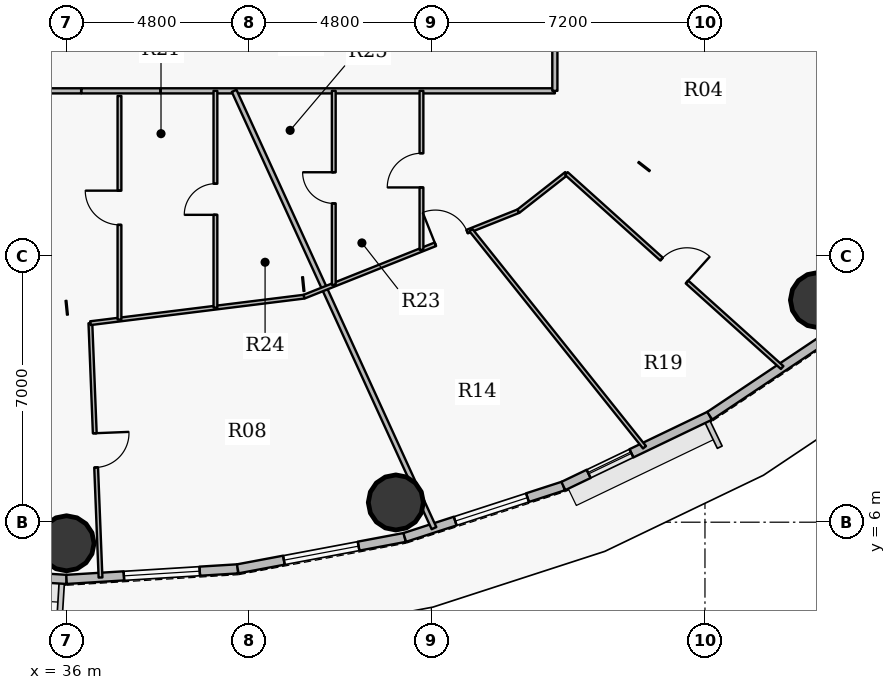
"""IFC4 building model, lengths in metres.
Left out: names, types, materials, properties, quantities, classifications, styles, units other than length and angle.
Written with IfcOpenShell. Run it as: python <this file> out.ifc"""

import sys

from ifc_helpers import new_model, si_unit, direction, frame, frame_2d, origin, origin_2d, place, context, subcontext, project, spatial, rectangle, hollow_circle, extrude, source, transform, mapped, element, fill, save


model = new_model("IFC4")
c1 = context("Model", 3, precision=1e-05, world=origin(), true_north=direction((0.0, 1.0)))
c2 = subcontext(c1, "Body", "Model", "MODEL_VIEW")
j1 = project(units=[si_unit("LENGTHUNIT", "METRE"), si_unit("PLANEANGLEUNIT", "RADIAN")], contexts=[c1])
p1 = place(None, origin())
s1 = spatial("IfcSite", under=j1, at=p1, CompositionType="ELEMENT")
p2 = place(p1, origin())
s2 = spatial("IfcBuilding", under=s1, at=p2, CompositionType="ELEMENT")
p3 = place(p2, frame((0.0, 0.0, 92.4)))
s3 = spatial("IfcBuildingStorey", under=s2, at=p3, CompositionType="ELEMENT", Elevation=92.4)
for number, where, z_axis, x_axis in (
    (1, (36.0, 5.445, -0.3), (0.0, 0.0, 1.0), (1.0, 0.0, 0.0)),
    (2, (44.666, 6.519, -0.3), (0.0, 0.0, 1.0), (1.0, 0.0, 0.0)),
    (3, (55.773, 11.844, -0.3), (0.0, 0.0, 1.0), (1.0, 0.0, 0.0)),
):
    element("IfcColumn", number, at=place(p3, frame(where, z_axis=z_axis, x_axis=x_axis)), inside=s3, PredefinedType="COLUMN", context=c2, shape_type="SweptSolid", body=[
        extrude(hollow_circle(Radius=0.725, WallThickness=0.042, at=origin_2d()), origin(), (0.0, 0.0, 1.0), 5.1),
    ])
p4 = place(p3, frame((36.0, 4.495, 0.0), z_axis=(0.0, 0.0, 1.0), x_axis=(-0.998107531589, 0.061492726276, 0.0)))
e4 = element("IfcWall", 4, at=p4, inside=s3, PredefinedType="SOLIDWALL", context=c2, shape_type="SweptSolid", body=[
    extrude(rectangle(XDim=4.514, YDim=0.24, at=frame_2d((2.257, 0.0))), origin(), (0.0, 0.0, 1.0), 4.55),
])
p5 = place(p4, frame((1.257, 0.0, 0.9)))
e5 = element("IfcOpeningElement", 5, at=p5, cuts=e4, PredefinedType="OPENING", context=c2, shape_type="SweptSolid", body=[
    extrude(rectangle(XDim=2.0, YDim=1.75, at=origin_2d()), frame((1.0, 0.13, 0.875), z_axis=(0.0, -1.0, 0.0), x_axis=(1.0, 0.0, 0.0)), (0.0, 0.0, 1.0), 0.26),
])
p6 = place(p3, frame((40.506, 4.773, 0.0), z_axis=(0.0, 0.0, 1.0), x_axis=(-0.998107531589, -0.061492726276, 0.0)))
e6 = element("IfcWall", 6, at=p6, inside=s3, PredefinedType="SOLIDWALL", context=c2, shape_type="SweptSolid", body=[
    extrude(rectangle(XDim=4.514, YDim=0.24, at=frame_2d((2.257, 0.0))), origin(), (0.0, 0.0, 1.0), 4.55),
])
p7 = place(p6, frame((1.001, 0.0, 0.9)))
e7 = element("IfcOpeningElement", 7, at=p7, cuts=e6, PredefinedType="OPENING", context=c2, shape_type="SweptSolid", body=[
    extrude(rectangle(XDim=2.0, YDim=1.75, at=origin_2d()), frame((1.0, 0.13, 0.875), z_axis=(0.0, -1.0, 0.0), x_axis=(1.0, 0.0, 0.0)), (0.0, 0.0, 1.0), 0.26),
])
p8 = place(p3, frame((44.9, 5.599, 0.0), z_axis=(0.0, 0.0, 1.0), x_axis=(-0.982789252177, -0.184730305596, 0.0)))
e8 = element("IfcWall", 8, at=p8, inside=s3, PredefinedType="SOLIDWALL", context=c2, shape_type="SweptSolid", body=[
    extrude(rectangle(XDim=4.471, YDim=0.24, at=frame_2d((2.235, 0.0))), origin(), (0.0, 0.0, 1.0), 4.55),
])
p9 = place(p8, frame((1.236, 0.0, 0.9)))
e9 = element("IfcOpeningElement", 9, at=p9, cuts=e8, PredefinedType="OPENING", context=c2, shape_type="SweptSolid", body=[
    extrude(rectangle(XDim=2.0, YDim=1.75, at=origin_2d()), frame((1.0, 0.13, 0.875), z_axis=(0.0, -1.0, 0.0), x_axis=(1.0, 0.0, 0.0)), (0.0, 0.0, 1.0), 0.26),
])
p10 = place(p3, frame((49.074, 6.953, 0.0), z_axis=(0.0, 0.0, 1.0), x_axis=(-0.951211346073, -0.308540070495, 0.0)))
e10 = element("IfcWall", 10, at=p10, inside=s3, PredefinedType="SOLIDWALL", context=c2, shape_type="SweptSolid", body=[
    extrude(rectangle(XDim=4.388, YDim=0.24, at=frame_2d((2.194, 0.0))), origin(), (0.0, 0.0, 1.0), 4.55),
])
p11 = place(p10, frame((0.992, 0.0, 0.9)))
e11 = element("IfcOpeningElement", 11, at=p11, cuts=e10, PredefinedType="OPENING", context=c2, shape_type="SweptSolid", body=[
    extrude(rectangle(XDim=2.0, YDim=1.75, at=origin_2d()), frame((1.0, 0.13, 0.875), z_axis=(0.0, -1.0, 0.0), x_axis=(1.0, 0.0, 0.0)), (0.0, 0.0, 1.0), 0.26),
])
p12 = place(p3, frame((52.925, 8.801, 0.0), z_axis=(0.0, 0.0, 1.0), x_axis=(-0.901589935876, -0.432591709962, 0.0)))
e12 = element("IfcWall", 12, at=p12, inside=s3, PredefinedType="SOLIDWALL", context=c2, shape_type="SweptSolid", body=[
    extrude(rectangle(XDim=4.272, YDim=0.24, at=frame_2d((2.136, 0.0))), origin(), (0.0, 0.0, 1.0), 4.55),
])
p13 = place(p12, frame((2.284, 0.0, 0.9)))
e13 = element("IfcOpeningElement", 13, at=p13, cuts=e12, PredefinedType="OPENING", context=c2, shape_type="SweptSolid", body=[
    extrude(rectangle(XDim=1.25, YDim=1.65, at=origin_2d()), frame((0.625, 0.13, 0.825), z_axis=(0.0, -1.0, 0.0), x_axis=(1.0, 0.0, 0.0)), (0.0, 0.0, 1.0), 0.26),
])
p14 = place(p3, frame((56.358, 11.097, 0.0), z_axis=(0.0, 0.0, 1.0), x_axis=(-0.831221811447, -0.555940914284, 0.0)))
e14 = element("IfcWall", 14, at=p14, inside=s3, PredefinedType="SOLIDWALL", context=c2, shape_type="SweptSolid", body=[
    extrude(rectangle(XDim=4.13, YDim=0.24, at=frame_2d((2.065, 0.0))), origin(), (0.0, 0.0, 1.0), 4.55),
])
p15 = place(p3, frame((23.15, 17.35, 0.0), z_axis=(0.0, 0.0, 1.0), x_axis=(1.0, 0.0, 0.0)))
e15 = element("IfcWall", 15, at=p15, inside=s3, PredefinedType="PARTITIONING", context=c2, shape_type="SweptSolid", body=[
    extrude(rectangle(XDim=13.235, YDim=0.135, at=frame_2d((6.617, 0.0))), origin(), (0.0, 0.0, 1.0), 3.985),
])
p16 = place(p15, frame((6.117, 0.0, 0.0)))
e16 = element("IfcOpeningElement", 16, at=p16, cuts=e15, PredefinedType="OPENING", context=c2, shape_type="SweptSolid", body=[
    extrude(rectangle(XDim=1.0, YDim=2.15, at=origin_2d()), frame((0.5, 0.078, 1.075), z_axis=(0.0, -1.0, 0.0), x_axis=(1.0, 0.0, 0.0)), (0.0, 0.0, 1.0), 0.155),
])
p17 = place(p3, frame((36.628, 11.237, 0.0), z_axis=(0.0, 0.0, 1.0), x_axis=(0.039809346011, -0.999207293794, 0.0)))
e17 = element("IfcWall", 17, at=p17, inside=s3, PredefinedType="PARTITIONING", context=c2, shape_type="SweptSolid", body=[
    extrude(rectangle(XDim=6.697, YDim=0.1, at=frame_2d((3.349, 0.0))), origin(), (0.0, 0.0, 1.0), 3.985),
])
p18 = place(p17, frame((2.898, 0.0, 0.0)))
e18 = element("IfcOpeningElement", 18, at=p18, cuts=e17, PredefinedType="OPENING", context=c2, shape_type="SweptSolid", body=[
    extrude(rectangle(XDim=0.9, YDim=2.1, at=origin_2d()), frame((0.45, 0.06, 1.05), z_axis=(0.0, -1.0, 0.0), x_axis=(1.0, 0.0, 0.0)), (0.0, 0.0, 1.0), 0.12),
])
p19 = place(p3, frame((36.628, 11.237, 0.0), z_axis=(0.0, 0.0, 1.0), x_axis=(0.992395411507, 0.123090808834, 0.0)))
e19 = element("IfcWall", 19, at=p19, inside=s3, PredefinedType="PARTITIONING", context=c2, shape_type="SweptSolid", body=[
    extrude(rectangle(XDim=5.667, YDim=0.1, at=frame_2d((2.833, 0.0))), origin(), (0.0, 0.0, 1.0), 3.985),
])
p20 = place(p3, frame((37.393, 11.332, 0.0), z_axis=(0.0, 0.0, 1.0), x_axis=(0.0, 1.0, 0.0)))
e20 = element("IfcWall", 20, at=p20, inside=s3, PredefinedType="PARTITIONING", context=c2, shape_type="SweptSolid", body=[
    extrude(rectangle(XDim=5.884, YDim=0.1, at=frame_2d((2.942, 0.0))), origin(), (0.0, 0.0, 1.0), 4.035),
])
p21 = place(p20, frame((2.492, 0.0, 0.0)))
e21 = element("IfcOpeningElement", 21, at=p21, cuts=e20, PredefinedType="OPENING", context=c2, shape_type="SweptSolid", body=[
    extrude(rectangle(XDim=0.9, YDim=2.1, at=origin_2d()), frame((0.45, 0.06, 1.05), z_axis=(0.0, -1.0, 0.0), x_axis=(1.0, 0.0, 0.0)), (0.0, 0.0, 1.0), 0.12),
])
p22 = place(p3, frame((38.477, 17.35, 0.0), z_axis=(0.0, 0.0, 1.0), x_axis=(1.0, 0.0, 0.0)))
e22 = element("IfcWall", 22, at=p22, inside=s3, PredefinedType="PARTITIONING", context=c2, shape_type="SweptSolid", body=[
    extrude(rectangle(XDim=10.373, YDim=0.135, at=frame_2d((5.187, 0.0))), origin(), (0.0, 0.0, 1.0), 3.985),
])
p23 = place(p3, frame((39.918, 11.645, 0.0), z_axis=(0.0, 0.0, 1.0), x_axis=(0.0, 1.0, 0.0)))
e23 = element("IfcWall", 23, at=p23, inside=s3, PredefinedType="PARTITIONING", context=c2, shape_type="SweptSolid", body=[
    extrude(rectangle(XDim=5.705, YDim=0.1, at=frame_2d((2.853, 0.0))), origin(), (0.0, 0.0, 1.0), 3.985),
])
p24 = place(p23, frame((2.442, 0.0, 0.0)))
e24 = element("IfcOpeningElement", 24, at=p24, cuts=e23, PredefinedType="OPENING", context=c2, shape_type="SweptSolid", body=[
    extrude(rectangle(XDim=0.82, YDim=2.1, at=origin_2d()), frame((0.41, 0.06, 1.05), z_axis=(0.0, -1.0, 0.0), x_axis=(1.0, 0.0, 0.0)), (0.0, 0.0, 1.0), 0.12),
])
p25 = place(p3, frame((40.41, 17.35, 0.0), z_axis=(0.0, 0.0, 1.0), x_axis=(0.415695001708, -0.909504076711, 0.0)))
e25 = element("IfcWall", 25, at=p25, inside=s3, PredefinedType="PARTITIONING", context=c2, shape_type="SweptSolid", body=[
    extrude(rectangle(XDim=12.652, YDim=0.135, at=frame_2d((6.326, 0.0))), origin(), (0.0, 0.0, 1.0), 3.985),
])
p26 = place(p3, frame((42.251, 11.934, 0.0), z_axis=(0.0, 0.0, 1.0), x_axis=(0.928803554156, 0.370572473055, 0.0)))
e26 = element("IfcWall", 26, at=p26, inside=s3, PredefinedType="PARTITIONING", context=c2, shape_type="SweptSolid", body=[
    extrude(rectangle(XDim=6.072, YDim=0.1, at=frame_2d((3.036, 0.0))), origin(), (0.0, 0.0, 1.0), 3.985),
])
p27 = place(p26, frame((3.719, 0.0, 0.0)))
e27 = element("IfcOpeningElement", 27, at=p27, cuts=e26, PredefinedType="OPENING", context=c2, shape_type="SweptSolid", body=[
    extrude(rectangle(XDim=0.9, YDim=2.1, at=origin_2d()), frame((0.45, 0.06, 1.05), z_axis=(0.0, -1.0, 0.0), x_axis=(1.0, 0.0, 0.0)), (0.0, 0.0, 1.0), 0.12),
])
p28 = place(p3, frame((43.032, 12.246, 0.0), z_axis=(0.0, 0.0, 1.0), x_axis=(0.0, 1.0, 0.0)))
e28 = element("IfcWall", 28, at=p28, inside=s3, PredefinedType="PARTITIONING", context=c2, shape_type="SweptSolid", body=[
    extrude(rectangle(XDim=5.104, YDim=0.1, at=frame_2d((2.552, 0.0))), origin(), (0.0, 0.0, 1.0), 4.55),
])
p29 = place(p28, frame((2.142, 0.0, 0.0)))
e29 = element("IfcOpeningElement", 29, at=p29, cuts=e28, PredefinedType="OPENING", context=c2, shape_type="SweptSolid", body=[
    extrude(rectangle(XDim=0.82, YDim=2.1, at=origin_2d()), frame((0.41, 0.06, 1.05), z_axis=(0.0, -1.0, 0.0), x_axis=(1.0, 0.0, 0.0)), (0.0, 0.0, 1.0), 0.12),
])
p30 = place(p3, frame((45.34, 13.167, 0.0), z_axis=(0.0, 0.0, 1.0), x_axis=(0.0, 1.0, 0.0)))
e30 = element("IfcWall", 30, at=p30, inside=s3, PredefinedType="PARTITIONING", context=c2, shape_type="SweptSolid", body=[
    extrude(rectangle(XDim=4.184, YDim=0.1, at=frame_2d((2.092, 0.0))), origin(), (0.0, 0.0, 1.0), 4.55),
])
p31 = place(p30, frame((1.642, 0.0, 0.0)))
e31 = element("IfcOpeningElement", 31, at=p31, cuts=e30, PredefinedType="OPENING", context=c2, shape_type="SweptSolid", body=[
    extrude(rectangle(XDim=0.9, YDim=2.1, at=origin_2d()), frame((0.45, 0.06, 1.05), z_axis=(0.0, -1.0, 0.0), x_axis=(1.0, 0.0, 0.0)), (0.0, 0.0, 1.0), 0.12),
])
p32 = place(p3, frame((46.642, 13.686, 0.0), z_axis=(0.0, 0.0, 1.0), x_axis=(0.624332747249, -0.781158511899, 0.0)))
e32 = element("IfcWall", 32, at=p32, inside=s3, PredefinedType="PARTITIONING", context=c2, shape_type="SweptSolid", body=[
    extrude(rectangle(XDim=7.315, YDim=0.1, at=frame_2d((3.658, 0.0))), origin(), (0.0, 0.0, 1.0), 3.985),
])
p33 = place(p3, frame((47.891, 14.184, 0.0), z_axis=(0.0, 0.0, 1.0), x_axis=(0.787373320688, 0.616476482819, 0.0)))
e33 = element("IfcWall", 33, at=p33, inside=s3, PredefinedType="PARTITIONING", context=c2, shape_type="SweptSolid", body=[
    extrude(rectangle(XDim=1.604, YDim=0.1, at=frame_2d((0.802, 0.0))), origin(), (0.0, 0.0, 1.0), 4.55),
])
p34 = place(p3, frame((48.85, 17.35, 0.0), z_axis=(0.0, 0.0, 1.0), x_axis=(0.0, 1.0, 0.0)))
e34 = element("IfcWall", 34, at=p34, inside=s3, PredefinedType="PARTITIONING", context=c2, shape_type="SweptSolid", body=[
    extrude(rectangle(XDim=19.3, YDim=0.135, at=frame_2d((9.65, 0.0))), origin(), (0.0, 0.0, 1.0), 3.985),
])
p35 = place(p34, frame((4.907, 0.0, 0.0)))
e35 = element("IfcOpeningElement", 35, at=p35, cuts=e34, PredefinedType="OPENING", context=c2, shape_type="SweptSolid", body=[
    extrude(rectangle(XDim=1.0, YDim=2.15, at=origin_2d()), frame((0.5, 0.078, 1.075), z_axis=(0.0, -1.0, 0.0), x_axis=(1.0, 0.0, 0.0)), (0.0, 0.0, 1.0), 0.155),
])
p36 = place(p34, frame((14.492, 0.0, 0.0)))
e36 = element("IfcOpeningElement", 36, at=p36, cuts=e34, PredefinedType="OPENING", context=c2, shape_type="SweptSolid", body=[
    extrude(rectangle(XDim=1.05, YDim=2.15, at=origin_2d()), frame((0.525, 0.078, 1.075), z_axis=(0.0, -1.0, 0.0), x_axis=(1.0, 0.0, 0.0)), (0.0, 0.0, 1.0), 0.155),
])
p37 = place(p3, frame((49.154, 15.173, 0.0), z_axis=(0.0, 0.0, 1.0), x_axis=(0.743623217159, -0.668598916318, 0.0)))
e37 = element("IfcWall", 37, at=p37, inside=s3, PredefinedType="PARTITIONING", context=c2, shape_type="SweptSolid", body=[
    extrude(rectangle(XDim=7.634, YDim=0.1, at=frame_2d((3.817, 0.0))), origin(), (0.0, 0.0, 1.0), 3.985),
])
p38 = place(p37, frame((3.367, 0.0, 0.0)))
e38 = element("IfcOpeningElement", 38, at=p38, cuts=e37, PredefinedType="OPENING", context=c2, shape_type="SweptSolid", body=[
    extrude(rectangle(XDim=0.9, YDim=2.1, at=origin_2d()), frame((0.45, 0.06, 1.05), z_axis=(0.0, -1.0, 0.0), x_axis=(1.0, 0.0, 0.0)), (0.0, 0.0, 1.0), 0.12),
])
p39 = place(p3, frame((54.42, 20.844, 0.0), z_axis=(0.0, 0.0, 1.0), x_axis=(0.948444660119, -0.316942781416, 0.0)))
e39 = element("IfcWall", 39, at=p39, inside=s3, PredefinedType="PARTITIONING", context=c2, shape_type="SweptSolid", body=[
    extrude(rectangle(XDim=8.399, YDim=0.1, at=frame_2d((4.199, 0.0))), origin(), (0.0, 0.0, 1.0), 3.985),
])
p40 = place(p39, frame((3.749, 0.0, 0.0)))
e40 = element("IfcOpeningElement", 40, at=p40, cuts=e39, PredefinedType="OPENING", context=c2, shape_type="SweptSolid", body=[
    extrude(rectangle(XDim=0.9, YDim=2.1, at=origin_2d()), frame((0.45, 0.06, 1.05), z_axis=(0.0, -1.0, 0.0), x_axis=(1.0, 0.0, 0.0)), (0.0, 0.0, 1.0), 0.12),
])
p41 = place(p3, frame((38.467, 17.35, 0.0), z_axis=(0.0, 0.0, 1.0), x_axis=(-1.0, 0.0, 0.0)))
e41 = element("IfcWall", 41, at=p41, inside=s3, PredefinedType="PARTITIONING", context=c2, shape_type="SweptSolid", body=[
    extrude(rectangle(XDim=2.073, YDim=0.135, at=frame_2d((1.036, 0.0))), origin(), (0.0, 0.0, 1.0), 4.55),
])
m1 = source(origin(), c2, "Body", "SweptSolid", [
    extrude(rectangle(XDim=2.0, YDim=1.75, at=origin_2d()), frame((1.0, 0.03, 0.875), z_axis=(0.0, -1.0, 0.0), x_axis=(1.0, 0.0, 0.0)), (0.0, 0.0, 1.0), 0.06),
])
p42 = place(p7, origin())
e42 = element("IfcWindow", 42, at=p42, inside=s3, PartitioningType="DOUBLE_PANEL_VERTICAL", PredefinedType="WINDOW", context=c2, shape_type="MappedRepresentation", body=[
    mapped(m1, transform((0.0, 0.0, 0.0), x_axis=(1.0, 0.0, 0.0), y_axis=(0.0, 1.0, 0.0), z_axis=(0.0, 0.0, 1.0), scale=1.0)),
])
fill(e7, e42)
p43 = place(p9, origin())
e43 = element("IfcWindow", 43, at=p43, inside=s3, PartitioningType="DOUBLE_PANEL_VERTICAL", PredefinedType="WINDOW", context=c2, shape_type="MappedRepresentation", body=[
    mapped(m1, transform((0.0, 0.0, 0.0), x_axis=(1.0, 0.0, 0.0), y_axis=(0.0, 1.0, 0.0), z_axis=(0.0, 0.0, 1.0), scale=1.0)),
])
fill(e9, e43)
p44 = place(p11, origin())
e44 = element("IfcWindow", 44, at=p44, inside=s3, PartitioningType="DOUBLE_PANEL_VERTICAL", PredefinedType="WINDOW", context=c2, shape_type="MappedRepresentation", body=[
    mapped(m1, transform((0.0, 0.0, 0.0), x_axis=(1.0, 0.0, 0.0), y_axis=(0.0, 1.0, 0.0), z_axis=(0.0, 0.0, 1.0), scale=1.0)),
])
fill(e11, e44)
m2 = source(origin(), c2, "Body", "SweptSolid", [
    extrude(rectangle(XDim=1.25, YDim=1.65, at=origin_2d()), frame((0.625, 0.03, 0.825), z_axis=(0.0, -1.0, 0.0), x_axis=(1.0, 0.0, 0.0)), (0.0, 0.0, 1.0), 0.06),
])
p45 = place(p13, origin())
e45 = element("IfcWindow", 45, at=p45, inside=s3, PartitioningType="SINGLE_PANEL", PredefinedType="WINDOW", context=c2, shape_type="MappedRepresentation", body=[
    mapped(m2, transform((0.0, 0.0, 0.0), x_axis=(1.0, 0.0, 0.0), y_axis=(0.0, 1.0, 0.0), z_axis=(0.0, 0.0, 1.0), scale=1.0)),
])
fill(e13, e45)
m3 = source(origin(), c2, "Body", "SweptSolid", [
    extrude(rectangle(XDim=0.9, YDim=2.1, at=origin_2d()), frame((0.45, 0.025, 1.05), z_axis=(0.0, -1.0, 0.0), x_axis=(1.0, 0.0, 0.0)), (0.0, 0.0, 1.0), 0.05),
])
p46 = place(p18, origin())
e46 = element("IfcDoor", 46, at=p46, inside=s3, OperationType="SINGLE_SWING_LEFT", PredefinedType="DOOR", context=c2, shape_type="MappedRepresentation", body=[
    mapped(m3, transform((0.0, 0.0, 0.0), x_axis=(1.0, 0.0, 0.0), y_axis=(0.0, 1.0, 0.0), z_axis=(0.0, 0.0, 1.0), scale=1.0)),
])
fill(e18, e46)
p47 = place(p21, origin())
e47 = element("IfcDoor", 47, at=p47, inside=s3, OperationType="SINGLE_SWING_RIGHT", PredefinedType="DOOR", context=c2, shape_type="MappedRepresentation", body=[
    mapped(m3, transform((0.0, 0.0, 0.0), x_axis=(1.0, 0.0, 0.0), y_axis=(0.0, 1.0, 0.0), z_axis=(0.0, 0.0, 1.0), scale=1.0)),
])
fill(e21, e47)
m4 = source(origin(), c2, "Body", "SweptSolid", [
    extrude(rectangle(XDim=0.82, YDim=2.1, at=origin_2d()), frame((0.41, 0.025, 1.05), z_axis=(0.0, -1.0, 0.0), x_axis=(1.0, 0.0, 0.0)), (0.0, 0.0, 1.0), 0.05),
])
p48 = place(p24, origin())
e48 = element("IfcDoor", 48, at=p48, inside=s3, OperationType="SINGLE_SWING_LEFT", PredefinedType="DOOR", context=c2, shape_type="MappedRepresentation", body=[
    mapped(m4, transform((0.0, 0.0, 0.0), x_axis=(1.0, 0.0, 0.0), y_axis=(0.0, 1.0, 0.0), z_axis=(0.0, 0.0, 1.0), scale=1.0)),
])
fill(e24, e48)
p49 = place(p27, origin())
e49 = element("IfcDoor", 49, at=p49, inside=s3, OperationType="SINGLE_SWING_LEFT", PredefinedType="DOOR", context=c2, shape_type="MappedRepresentation", body=[
    mapped(m3, transform((0.0, 0.0, 0.0), x_axis=(1.0, 0.0, 0.0), y_axis=(0.0, 1.0, 0.0), z_axis=(0.0, 0.0, 1.0), scale=1.0)),
])
fill(e27, e49)
p50 = place(p38, origin())
e50 = element("IfcDoor", 50, at=p50, inside=s3, OperationType="SINGLE_SWING_RIGHT", PredefinedType="DOOR", context=c2, shape_type="MappedRepresentation", body=[
    mapped(m3, transform((0.0, 0.0, 0.0), x_axis=(1.0, 0.0, 0.0), y_axis=(0.0, 1.0, 0.0), z_axis=(0.0, 0.0, 1.0), scale=1.0)),
])
fill(e38, e50)
p51 = place(p31, origin())
e51 = element("IfcDoor", 51, at=p51, inside=s3, OperationType="SINGLE_SWING_LEFT", PredefinedType="DOOR", context=c2, shape_type="MappedRepresentation", body=[
    mapped(m3, transform((0.0, 0.0, 0.0), x_axis=(1.0, 0.0, 0.0), y_axis=(0.0, 1.0, 0.0), z_axis=(0.0, 0.0, 1.0), scale=1.0)),
])
fill(e31, e51)
p52 = place(p29, origin())
e52 = element("IfcDoor", 52, at=p52, inside=s3, OperationType="SINGLE_SWING_RIGHT", PredefinedType="DOOR", context=c2, shape_type="MappedRepresentation", body=[
    mapped(m4, transform((0.0, 0.0, 0.0), x_axis=(1.0, 0.0, 0.0), y_axis=(0.0, 1.0, 0.0), z_axis=(0.0, 0.0, 1.0), scale=1.0)),
])
fill(e29, e52)
save(model, sys.argv[1])
